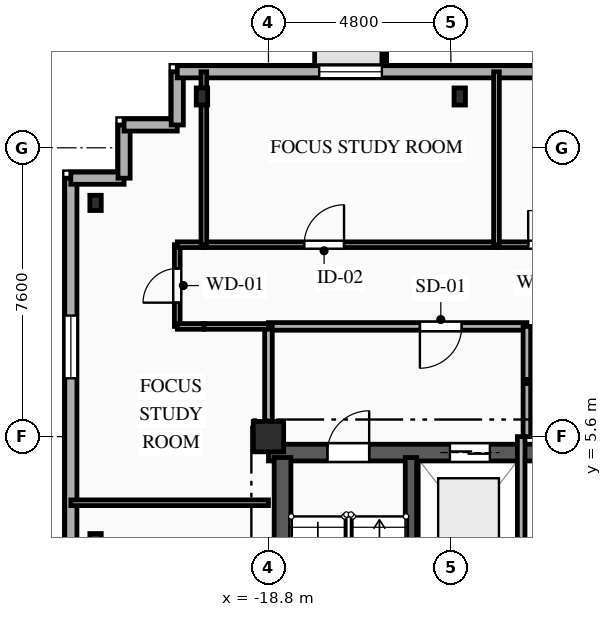
"""IFC4 building model, lengths in metres.
Left out: names, types, materials, properties, quantities, classifications, styles, units other than length and angle.
Written with IfcOpenShell. Run it as: python <this file> out.ifc"""

import sys

from ifc_helpers import new_model, si_unit, direction, frame, frame_2d, origin, origin_2d, place, context, subcontext, project, spatial, rectangle, i_section, extrude, element, fill, save


model = new_model("IFC4")
c1 = context("Model", 3, precision=1e-05, world=origin(), true_north=direction((0.0, 1.0)))
c2 = subcontext(c1, "Body", "Model", "MODEL_VIEW")
j1 = project(units=[si_unit("LENGTHUNIT", "METRE"), si_unit("PLANEANGLEUNIT", "RADIAN")], contexts=[c1])
p1 = place(None, origin())
s1 = spatial("IfcSite", under=j1, at=p1, CompositionType="ELEMENT")
p2 = place(p1, origin())
s2 = spatial("IfcBuilding", under=s1, at=p2, CompositionType="ELEMENT")
p3 = place(p2, frame((0.0, 0.0, 255.1)))
s3 = spatial("IfcBuildingStorey", under=s2, at=p3, CompositionType="ELEMENT", Elevation=255.1)
p4 = place(p3, frame((-18.8, 5.6, 0.0), z_axis=(0.0, 0.0, 1.0), x_axis=(1.0, 0.0, 0.0)))
e1 = element("IfcColumn", 1, at=p4, inside=s3, PredefinedType="COLUMN", context=c2, shape_type="SweptSolid", body=[
    extrude(rectangle(XDim=0.8, YDim=0.8, at=origin_2d()), origin(), (0.0, 0.0, 1.0), 3.35),
])
for number, where, z_axis, x_axis in (
    (2, (-13.767, 14.55, 0.0), (0.0, 0.0, 1.0), (1.0, 0.0, 0.0)),
    (3, (-20.55, 14.55, 0.0), (0.0, 0.0, 1.0), (1.0, 0.0, 0.0)),
):
    element("IfcColumn", number, at=place(p3, frame(where, z_axis=z_axis, x_axis=x_axis)), inside=s3, PredefinedType="COLUMN", context=c2, shape_type="SweptSolid", body=[
        extrude(i_section(OverallWidth=0.3, OverallDepth=0.45, WebThickness=0.014, FlangeThickness=0.026, FilletRadius=0.027, at=origin_2d()), origin(), (0.0, 0.0, 1.0), 3.35),
    ])
for number, where, z_axis, x_axis in (
    (4, (-23.35, 11.75, 0.0), (0.0, 0.0, 1.0), (1.0, 0.0, 0.0)),
    (5, (-23.35, 2.85, 0.0), (0.0, 0.0, 1.0), (1.0, 0.0, 0.0)),
):
    element("IfcColumn", number, at=place(p3, frame(where, z_axis=z_axis, x_axis=x_axis)), inside=s3, PredefinedType="COLUMN", context=c2, shape_type="SweptSolid", body=[
        extrude(i_section(OverallWidth=0.3, OverallDepth=0.4, WebThickness=0.013, FlangeThickness=0.024, FilletRadius=0.027, at=origin_2d()), origin(), (0.0, 0.0, 1.0), 3.35),
    ])
p5 = place(p3, frame((-24.0, -15.6, 0.0), z_axis=(0.0, 0.0, 1.0), x_axis=(0.0, 1.0, 0.0)))
e6 = element("IfcWall", 6, at=p5, inside=s3, PredefinedType="SOLIDWALL", context=c2, shape_type="SweptSolid", body=[
    extrude(rectangle(XDim=28.0, YDim=0.32, at=frame_2d((14.0, 0.0))), origin(), (0.0, 0.0, 1.0), 3.04),
])
p6 = place(p5, frame((3.695, 0.0, 0.85)))
e7 = element("IfcOpeningElement", 7, at=p6, cuts=e6, PredefinedType="OPENING", context=c2, shape_type="SweptSolid", body=[
    extrude(rectangle(XDim=1.65, YDim=1.85, at=frame_2d((0.825, 0.925))), frame((0.0, 0.17, 0.0), z_axis=(0.0, -1.0, 0.0), x_axis=(1.0, 0.0, 0.0)), (0.0, 0.0, 1.0), 0.34),
])
p7 = place(p5, frame((13.215, 0.0, 0.85)))
e8 = element("IfcOpeningElement", 8, at=p7, cuts=e6, PredefinedType="OPENING", context=c2, shape_type="SweptSolid", body=[
    extrude(rectangle(XDim=1.65, YDim=1.85, at=frame_2d((0.825, 0.925))), frame((0.0, 0.17, 0.0), z_axis=(0.0, -1.0, 0.0), x_axis=(1.0, 0.0, 0.0)), (0.0, 0.0, 1.0), 0.34),
])
p8 = place(p5, frame((22.735, 0.0, 0.85)))
e9 = element("IfcOpeningElement", 9, at=p8, cuts=e6, PredefinedType="OPENING", context=c2, shape_type="SweptSolid", body=[
    extrude(rectangle(XDim=1.65, YDim=1.85, at=frame_2d((0.825, 0.925))), frame((0.0, 0.17, 0.0), z_axis=(0.0, -1.0, 0.0), x_axis=(1.0, 0.0, 0.0)), (0.0, 0.0, 1.0), 0.34),
])
p9 = place(p3, frame((-24.0, 12.4, 0.0), z_axis=(0.0, 0.0, 1.0), x_axis=(1.0, 0.0, 0.0)))
e10 = element("IfcWall", 10, at=p9, inside=s3, PredefinedType="SOLIDWALL", context=c2, shape_type="SweptSolid", body=[
    extrude(rectangle(XDim=1.4, YDim=0.32, at=frame_2d((0.7, 0.0))), origin(), (0.0, 0.0, 1.0), 3.04),
])
for number, where, z_axis, x_axis in (
    (11, (-22.6, 12.4, 0.0), (0.0, 0.0, 1.0), (0.0, 1.0, 0.0)),
    (12, (-22.6, 13.8, 0.0), (0.0, 0.0, 1.0), (1.0, 0.0, 0.0)),
):
    element("IfcWall", number, at=place(p3, frame(where, z_axis=z_axis, x_axis=x_axis)), inside=s3, PredefinedType="SOLIDWALL", context=c2, shape_type="SweptSolid", body=[
        extrude(rectangle(XDim=1.4, YDim=0.32, at=frame_2d((0.7, 0.0))), origin(), (0.0, 0.0, 1.0), 3.04),
    ])
p10 = place(p3, frame((-21.2, 13.8, 0.0), z_axis=(0.0, 0.0, 1.0), x_axis=(0.0, 1.0, 0.0)))
e13 = element("IfcWall", 13, at=p10, inside=s3, PredefinedType="SOLIDWALL", context=c2, shape_type="SweptSolid", body=[
    extrude(rectangle(XDim=1.4, YDim=0.32, at=frame_2d((0.7, 0.0))), origin(), (0.0, 0.0, 1.0), 3.04),
])
p11 = place(p3, frame((-21.2, 15.2, 0.0), z_axis=(0.0, 0.0, 1.0), x_axis=(1.0, 0.0, 0.0)))
e14 = element("IfcWall", 14, at=p11, inside=s3, PredefinedType="SOLIDWALL", context=c2, shape_type="SweptSolid", body=[
    extrude(rectangle(XDim=42.0, YDim=0.32, at=frame_2d((21.0, 0.0))), origin(), (0.0, 0.0, 1.0), 3.04),
])
p12 = place(p11, frame((3.735, 0.0, 0.85)))
e15 = element("IfcOpeningElement", 15, at=p12, cuts=e14, PredefinedType="OPENING", context=c2, shape_type="SweptSolid", body=[
    extrude(rectangle(XDim=1.65, YDim=1.85, at=frame_2d((0.825, 0.925))), frame((0.0, 0.17, 0.0), z_axis=(0.0, -1.0, 0.0), x_axis=(1.0, 0.0, 0.0)), (0.0, 0.0, 1.0), 0.34),
])
p13 = place(p11, frame((12.97, 0.0, 0.85)))
e16 = element("IfcOpeningElement", 16, at=p13, cuts=e14, PredefinedType="OPENING", context=c2, shape_type="SweptSolid", body=[
    extrude(rectangle(XDim=1.5, YDim=1.85, at=frame_2d((0.75, 0.925))), frame((0.0, 0.17, 0.0), z_axis=(0.0, -1.0, 0.0), x_axis=(1.0, 0.0, 0.0)), (0.0, 0.0, 1.0), 0.34),
])
p14 = place(p11, frame((19.895, 0.0, 0.85)))
e17 = element("IfcOpeningElement", 17, at=p14, cuts=e14, PredefinedType="OPENING", context=c2, shape_type="SweptSolid", body=[
    extrude(rectangle(XDim=1.65, YDim=1.85, at=frame_2d((0.825, 0.925))), frame((0.0, 0.17, 0.0), z_axis=(0.0, -1.0, 0.0), x_axis=(1.0, 0.0, 0.0)), (0.0, 0.0, 1.0), 0.34),
])
p15 = place(p11, frame((28.095, 0.0, 0.85)))
e18 = element("IfcOpeningElement", 18, at=p15, cuts=e14, PredefinedType="OPENING", context=c2, shape_type="SweptSolid", body=[
    extrude(rectangle(XDim=1.65, YDim=1.85, at=frame_2d((0.825, 0.925))), frame((0.0, 0.17, 0.0), z_axis=(0.0, -1.0, 0.0), x_axis=(1.0, 0.0, 0.0)), (0.0, 0.0, 1.0), 0.34),
])
p16 = place(p11, frame((36.495, 0.0, 0.85)))
e19 = element("IfcOpeningElement", 19, at=p16, cuts=e14, PredefinedType="OPENING", context=c2, shape_type="SweptSolid", body=[
    extrude(rectangle(XDim=1.65, YDim=1.85, at=frame_2d((0.825, 0.925))), frame((0.0, 0.17, 0.0), z_axis=(0.0, -1.0, 0.0), x_axis=(1.0, 0.0, 0.0)), (0.0, 0.0, 1.0), 0.34),
])
p17 = place(p3, frame((-18.8, 5.18, 0.0), z_axis=(0.0, 0.0, 1.0), x_axis=(1.0, 0.0, 0.0)))
e20 = element("IfcWall", 20, at=p17, inside=s3, PredefinedType="SHEAR", context=c2, shape_type="SweptSolid", body=[
    extrude(rectangle(XDim=9.6, YDim=0.44, at=frame_2d((4.8, 0.0))), origin(), (0.0, 0.0, 1.0), 3.04),
])
p18 = place(p17, frame((1.55, 0.0, 0.0)))
e21 = element("IfcOpeningElement", 21, at=p18, cuts=e20, PredefinedType="OPENING", context=c2, shape_type="SweptSolid", body=[
    extrude(rectangle(XDim=1.1, YDim=2.15, at=frame_2d((0.55, 1.075))), frame((0.0, 0.23, 0.0), z_axis=(0.0, -1.0, 0.0), x_axis=(1.0, 0.0, 0.0)), (0.0, 0.0, 1.0), 0.46),
])
p19 = place(p17, frame((4.775, 0.0, 0.0)))
e22 = element("IfcOpeningElement", 22, at=p19, cuts=e20, PredefinedType="OPENING", context=c2, shape_type="SweptSolid", body=[
    extrude(rectangle(XDim=1.05, YDim=2.1, at=frame_2d((0.525, 1.05))), frame((0.0, 0.23, 0.0), z_axis=(0.0, -1.0, 0.0), x_axis=(1.0, 0.0, 0.0)), (0.0, 0.0, 1.0), 0.46),
])
p20 = place(p3, frame((-18.43, -5.05, 0.0), z_axis=(0.0, 0.0, 1.0), x_axis=(0.0, 1.0, 0.0)))
e23 = element("IfcWall", 23, at=p20, inside=s3, PredefinedType="SHEAR", context=c2, shape_type="SweptSolid", body=[
    extrude(rectangle(XDim=10.1, YDim=0.44, at=frame_2d((5.05, 0.0))), origin(), (0.0, 0.0, 1.0), 3.04),
])
p21 = place(p3, frame((-15.05, -5.05, 0.0), z_axis=(0.0, 0.0, 1.0), x_axis=(0.0, 1.0, 0.0)))
e24 = element("IfcWall", 24, at=p21, inside=s3, PredefinedType="SHEAR", context=c2, shape_type="SweptSolid", body=[
    extrude(rectangle(XDim=10.1, YDim=0.3, at=frame_2d((5.05, 0.0))), origin(), (0.0, 0.0, 1.0), 3.04),
])
p22 = place(p3, frame((-12.15, 1.55, 0.0), z_axis=(0.0, 0.0, 1.0), x_axis=(0.0, 1.0, 0.0)))
e25 = element("IfcWall", 25, at=p22, inside=s3, PredefinedType="PARTITIONING", context=c2, shape_type="SweptSolid", body=[
    extrude(rectangle(XDim=4.05, YDim=0.2, at=frame_2d((2.025, 0.0))), origin(), (0.0, 0.0, 1.0), 3.04),
])
p23 = place(p3, frame((-12.0, 8.5, 0.0), z_axis=(0.0, 0.0, 1.0), x_axis=(-1.0, 0.0, 0.0)))
e26 = element("IfcWall", 26, at=p23, inside=s3, PredefinedType="PARTITIONING", context=c2, shape_type="SweptSolid", body=[
    extrude(rectangle(XDim=6.8, YDim=0.2, at=frame_2d((3.4, 0.0))), origin(), (0.0, 0.0, 1.0), 3.04),
])
p24 = place(p23, frame((1.715, 0.0, 0.0)))
e27 = element("IfcOpeningElement", 27, at=p24, cuts=e26, PredefinedType="OPENING", context=c2, shape_type="SweptSolid", body=[
    extrude(rectangle(XDim=1.1, YDim=2.15, at=frame_2d((0.55, 1.075))), frame((0.0, 0.11, 0.0), z_axis=(0.0, -1.0, 0.0), x_axis=(1.0, 0.0, 0.0)), (0.0, 0.0, 1.0), 0.22),
])
p25 = place(p3, frame((-12.0, 5.6, 0.0), z_axis=(0.0, 0.0, 1.0), x_axis=(0.0, 1.0, 0.0)))
e28 = element("IfcWall", 28, at=p25, inside=s3, PredefinedType="PARTITIONING", context=c2, shape_type="SweptSolid", body=[
    extrude(rectangle(XDim=2.9, YDim=0.2, at=frame_2d((1.45, 0.0))), origin(), (0.0, 0.0, 1.0), 3.04),
])
p26 = place(p3, frame((-18.8, 8.5, 0.0), z_axis=(0.0, 0.0, 1.0), x_axis=(0.0, -1.0, 0.0)))
e29 = element("IfcWall", 29, at=p26, inside=s3, PredefinedType="PARTITIONING", context=c2, shape_type="SweptSolid", body=[
    extrude(rectangle(XDim=2.9, YDim=0.2, at=frame_2d((1.45, 0.0))), origin(), (0.0, 0.0, 1.0), 2.665),
])
p27 = place(p3, frame((-21.2, 8.5, 0.0), z_axis=(0.0, 0.0, 1.0), x_axis=(0.0, 1.0, 0.0)))
e30 = element("IfcWall", 30, at=p27, inside=s3, PredefinedType="PARTITIONING", context=c2, shape_type="SweptSolid", body=[
    extrude(rectangle(XDim=2.15, YDim=0.15, at=frame_2d((1.075, 0.0))), origin(), (0.0, 0.0, 1.0), 2.695),
])
p28 = place(p27, frame((0.625, 0.0, 0.0)))
e31 = element("IfcOpeningElement", 31, at=p28, cuts=e30, PredefinedType="OPENING", context=c2, shape_type="SweptSolid", body=[
    extrude(rectangle(XDim=0.9, YDim=2.1, at=frame_2d((0.45, 1.05))), frame((0.0, 0.085, 0.0), z_axis=(0.0, -1.0, 0.0), x_axis=(1.0, 0.0, 0.0)), (0.0, 0.0, 1.0), 0.17),
])
p29 = place(p3, frame((-18.8, 8.5, 0.0), z_axis=(0.0, 0.0, 1.0), x_axis=(-1.0, 0.0, 0.0)))
e32 = element("IfcWall", 32, at=p29, inside=s3, PredefinedType="PARTITIONING", context=c2, shape_type="SweptSolid", body=[
    extrude(rectangle(XDim=1.7, YDim=0.15, at=frame_2d((0.85, 0.0))), origin(), (0.0, 0.0, 1.0), 3.04),
])
for number, where, z_axis, x_axis in (
    (33, (-20.5, 8.5, 0.0), (0.0, 0.0, 1.0), (-1.0, 0.0, 0.0)),
    (34, (-21.2, 10.65, 0.0), (0.0, 0.0, 1.0), (1.0, 0.0, 0.0)),
):
    element("IfcWall", number, at=place(p3, frame(where, z_axis=z_axis, x_axis=x_axis)), inside=s3, PredefinedType="PARTITIONING", context=c2, shape_type="SweptSolid", body=[
        extrude(rectangle(XDim=0.7, YDim=0.15, at=frame_2d((0.35, 0.0))), origin(), (0.0, 0.0, 1.0), 3.04),
    ])
p30 = place(p3, frame((-20.5, 10.65, 0.0), z_axis=(0.0, 0.0, 1.0), x_axis=(1.0, 0.0, 0.0)))
e35 = element("IfcWall", 35, at=p30, inside=s3, PredefinedType="PARTITIONING", context=c2, shape_type="SweptSolid", body=[
    extrude(rectangle(XDim=7.7, YDim=0.15, at=frame_2d((3.85, 0.0))), origin(), (0.0, 0.0, 1.0), 3.04),
])
p31 = place(p30, frame((2.639, 0.0, 0.0)))
e36 = element("IfcOpeningElement", 36, at=p31, cuts=e35, PredefinedType="OPENING", context=c2, shape_type="SweptSolid", body=[
    extrude(rectangle(XDim=1.05, YDim=2.15, at=frame_2d((0.525, 1.075))), frame((0.0, 0.085, 0.0), z_axis=(0.0, -1.0, 0.0), x_axis=(1.0, 0.0, 0.0)), (0.0, 0.0, 1.0), 0.17),
])
p32 = place(p3, frame((-12.8, 10.65, 0.0), z_axis=(0.0, 0.0, 1.0), x_axis=(1.0, 0.0, 0.0)))
e37 = element("IfcWall", 37, at=p32, inside=s3, PredefinedType="PLUMBINGWALL", context=c2, shape_type="SweptSolid", body=[
    extrude(rectangle(XDim=2.35, YDim=0.15, at=frame_2d((1.175, 0.0))), origin(), (0.0, 0.0, 1.0), 3.04),
])
p33 = place(p32, frame((0.834, 0.0, 0.0)))
e38 = element("IfcOpeningElement", 38, at=p33, cuts=e37, PredefinedType="OPENING", context=c2, shape_type="SweptSolid", body=[
    extrude(rectangle(XDim=0.9, YDim=2.1, at=frame_2d((0.45, 1.05))), frame((0.0, 0.085, 0.0), z_axis=(0.0, -1.0, 0.0), x_axis=(1.0, 0.0, 0.0)), (0.0, 0.0, 1.0), 0.17),
])
p34 = place(p3, frame((-24.0, 3.86, 0.0), z_axis=(0.0, 0.0, 1.0), x_axis=(1.0, 0.0, 0.0)))
e39 = element("IfcWall", 39, at=p34, inside=s3, PredefinedType="PARTITIONING", context=c2, shape_type="SweptSolid", body=[
    extrude(rectangle(XDim=5.2, YDim=0.15, at=frame_2d((2.6, 0.0))), origin(), (0.0, 0.0, 1.0), 3.04),
])
p35 = place(p3, frame((-20.5, 15.2, 0.0), z_axis=(0.0, 0.0, 1.0), x_axis=(0.0, -1.0, 0.0)))
e40 = element("IfcWall", 40, at=p35, inside=s3, PredefinedType="PARTITIONING", context=c2, shape_type="SweptSolid", body=[
    extrude(rectangle(XDim=4.55, YDim=0.15, at=frame_2d((2.275, 0.0))), origin(), (0.0, 0.0, 1.0), 2.665),
])
p36 = place(p3, frame((-12.8, 15.2, 0.0), z_axis=(0.0, 0.0, 1.0), x_axis=(0.0, -1.0, 0.0)))
e41 = element("IfcWall", 41, at=p36, inside=s3, PredefinedType="PLUMBINGWALL", context=c2, shape_type="SweptSolid", body=[
    extrude(rectangle(XDim=4.55, YDim=0.15, at=frame_2d((2.275, 0.0))), origin(), (0.0, 0.0, 1.0), 3.04),
])
p37 = place(p8, origin())
e42 = element("IfcWindow", 42, at=p37, inside=s3, PartitioningType="SINGLE_PANEL", PredefinedType="WINDOW", context=c2, shape_type="SweptSolid", body=[
    extrude(rectangle(XDim=1.65, YDim=1.85, at=frame_2d((0.825, 0.925))), frame((0.0, 0.03, 0.0), z_axis=(0.0, -1.0, 0.0), x_axis=(1.0, 0.0, 0.0)), (0.0, 0.0, 1.0), 0.06),
])
fill(e9, e42)
p38 = place(p12, origin())
e43 = element("IfcWindow", 43, at=p38, inside=s3, PartitioningType="SINGLE_PANEL", PredefinedType="WINDOW", context=c2, shape_type="SweptSolid", body=[
    extrude(rectangle(XDim=1.65, YDim=1.85, at=frame_2d((0.825, 0.925))), frame((0.0, 0.03, 0.0), z_axis=(0.0, -1.0, 0.0), x_axis=(1.0, 0.0, 0.0)), (0.0, 0.0, 1.0), 0.06),
])
fill(e15, e43)
p39 = place(p18, origin())
e44 = element("IfcDoor", 44, at=p39, inside=s3, OperationType="SINGLE_SWING_RIGHT", PredefinedType="DOOR", context=c2, shape_type="SweptSolid", body=[
    extrude(rectangle(XDim=1.1, YDim=2.15, at=frame_2d((0.55, 1.075))), frame((0.0, 0.025, 0.0), z_axis=(0.0, -1.0, 0.0), x_axis=(1.0, 0.0, 0.0)), (0.0, 0.0, 1.0), 0.05),
])
fill(e21, e44)
p40 = place(p19, origin())
e45 = element("IfcDoor", 45, at=p40, inside=s3, OperationType="DOUBLE_DOOR_SLIDING", PredefinedType="DOOR", context=c2, shape_type="SweptSolid", body=[
    extrude(rectangle(XDim=1.05, YDim=2.1, at=frame_2d((0.525, 1.05))), frame((0.0, 0.025, 0.0), z_axis=(0.0, -1.0, 0.0), x_axis=(1.0, 0.0, 0.0)), (0.0, 0.0, 1.0), 0.05),
])
fill(e22, e45)
p41 = place(p24, origin())
e46 = element("IfcDoor", 46, at=p41, inside=s3, OperationType="SINGLE_SWING_RIGHT", PredefinedType="DOOR", context=c2, shape_type="SweptSolid", body=[
    extrude(rectangle(XDim=1.1, YDim=2.15, at=frame_2d((0.55, 1.075))), frame((0.0, 0.025, 0.0), z_axis=(0.0, -1.0, 0.0), x_axis=(1.0, 0.0, 0.0)), (0.0, 0.0, 1.0), 0.05),
])
fill(e27, e46)
p42 = place(p28, origin())
e47 = element("IfcDoor", 47, at=p42, inside=s3, OperationType="SINGLE_SWING_LEFT", PredefinedType="DOOR", context=c2, shape_type="SweptSolid", body=[
    extrude(rectangle(XDim=0.9, YDim=2.1, at=frame_2d((0.45, 1.05))), frame((0.0, 0.025, 0.0), z_axis=(0.0, -1.0, 0.0), x_axis=(1.0, 0.0, 0.0)), (0.0, 0.0, 1.0), 0.05),
])
fill(e31, e47)
p43 = place(p31, origin())
e48 = element("IfcDoor", 48, at=p43, inside=s3, OperationType="SINGLE_SWING_RIGHT", PredefinedType="DOOR", context=c2, shape_type="SweptSolid", body=[
    extrude(rectangle(XDim=1.05, YDim=2.15, at=frame_2d((0.525, 1.075))), frame((0.0, 0.025, 0.0), z_axis=(0.0, -1.0, 0.0), x_axis=(1.0, 0.0, 0.0)), (0.0, 0.0, 1.0), 0.05),
])
fill(e36, e48)
p44 = place(p33, origin())
e49 = element("IfcDoor", 49, at=p44, inside=s3, OperationType="SINGLE_SWING_LEFT", PredefinedType="DOOR", context=c2, shape_type="SweptSolid", body=[
    extrude(rectangle(XDim=0.9, YDim=2.1, at=frame_2d((0.45, 1.05))), frame((0.0, 0.025, 0.0), z_axis=(0.0, -1.0, 0.0), x_axis=(1.0, 0.0, 0.0)), (0.0, 0.0, 1.0), 0.05),
])
fill(e38, e49)
save(model, sys.argv[1])
